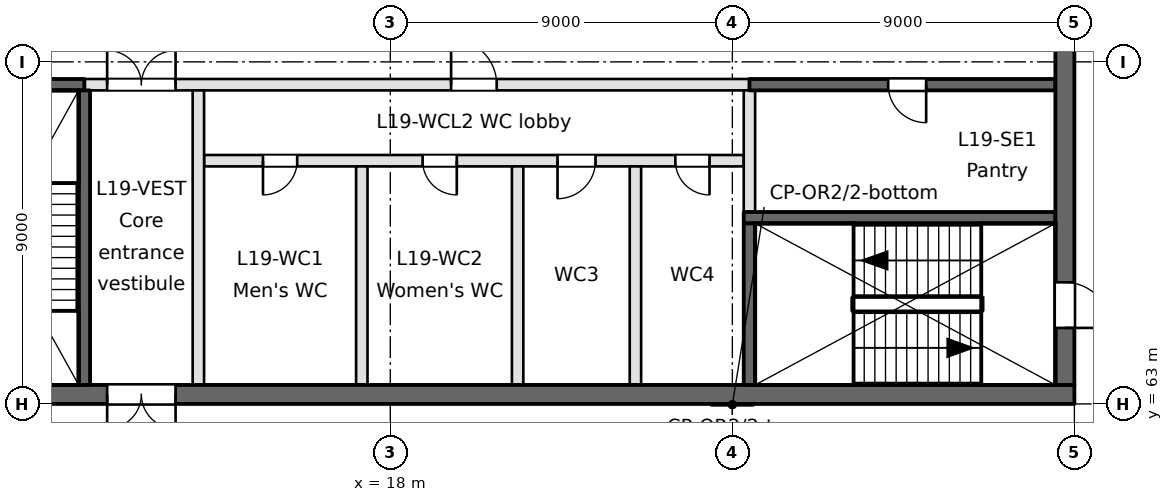
"""IFC4 building model, lengths in metres.
Left out: names, types, materials, properties, quantities, classifications, styles, units other than length and angle.
Written with IfcOpenShell. Run it as: python <this file> out.ifc"""

import sys

from ifc_helpers import new_model, si_unit, direction, frame, frame_2d, origin, place, context, subcontext, project, spatial, rectangle, extrude, element, fill, save


model = new_model("IFC4")
c1 = context("Model", 3, precision=1e-05, world=origin(), true_north=direction((0.0, 1.0)))
c2 = subcontext(c1, "Body", "Model", "MODEL_VIEW")
j1 = project(units=[si_unit("LENGTHUNIT", "METRE"), si_unit("PLANEANGLEUNIT", "RADIAN")], contexts=[c1])
p1 = place(None, origin())
s1 = spatial("IfcSite", under=j1, at=p1, CompositionType="ELEMENT")
p2 = place(p1, origin())
s2 = spatial("IfcBuilding", under=s1, at=p2, CompositionType="ELEMENT")
p3 = place(p2, frame((0.0, 0.0, 80.2)))
s3 = spatial("IfcBuildingStorey", under=s2, at=p3, CompositionType="ELEMENT", Elevation=80.2)
p4 = place(p3, frame((0.9, 63.25, -0.45), z_axis=(0.0, 0.0, 1.0), x_axis=(1.0, 0.0, 0.0)))
e1 = element("IfcWall", 1, at=p4, inside=s3, PredefinedType="SOLIDWALL", context=c2, shape_type="SweptSolid", body=[
    extrude(rectangle(XDim=35.1, YDim=0.5, at=frame_2d((17.55, 0.0))), origin(), (0.0, 0.0, 1.0), 4.65),
])
p5 = place(p4, frame((9.65, 0.0, 0.45)))
e2 = element("IfcOpeningElement", 2, at=p5, cuts=e1, PredefinedType="OPENING", context=c2, shape_type="SweptSolid", body=[
    extrude(rectangle(XDim=1.8, YDim=2.1, at=frame_2d((0.9, 1.05))), frame((0.0, 0.25, 0.0), z_axis=(0.0, -1.0, 0.0), x_axis=(1.0, 0.0, 0.0)), (0.0, 0.0, 1.0), 0.5),
])
p6 = place(p4, frame((1.55, 0.0, 0.45)))
e3 = element("IfcOpeningElement", 3, at=p6, cuts=e1, PredefinedType="OPENING", context=c2, shape_type="SweptSolid", body=[
    extrude(rectangle(XDim=1.2, YDim=2.1, at=frame_2d((0.6, 1.05))), frame((0.0, 0.25, 0.0), z_axis=(0.0, -1.0, 0.0), x_axis=(1.0, 0.0, 0.0)), (0.0, 0.0, 1.0), 0.5),
])
p7 = place(p4, frame((6.15, 0.0, 0.45)))
e4 = element("IfcOpeningElement", 4, at=p7, cuts=e1, PredefinedType="OPENING", context=c2, shape_type="SweptSolid", body=[
    extrude(rectangle(XDim=1.2, YDim=2.1, at=frame_2d((0.6, 1.05))), frame((0.0, 0.25, 0.0), z_axis=(0.0, -1.0, 0.0), x_axis=(1.0, 0.0, 0.0)), (0.0, 0.0, 1.0), 0.5),
])
p8 = place(p3, frame((27.3, 67.9, -0.45), z_axis=(0.0, 0.0, 1.0), x_axis=(1.0, 0.0, 0.0)))
e5 = element("IfcWall", 5, at=p8, inside=s3, PredefinedType="SOLIDWALL", context=c2, shape_type="SweptSolid", body=[
    extrude(rectangle(XDim=8.2, YDim=0.3, at=frame_2d((4.1, 0.0))), origin(), (0.0, 0.0, 1.0), 4.65),
])
p9 = place(p3, frame((13.1, 69.4, 0.0), z_axis=(0.0, 0.0, 1.0), x_axis=(1.0, 0.0, 0.0)))
e6 = element("IfcWall", 6, at=p9, inside=s3, PredefinedType="PARTITIONING", context=c2, shape_type="SweptSolid", body=[
    extrude(rectangle(XDim=14.2, YDim=0.3, at=frame_2d((7.1, 0.0))), origin(), (0.0, 0.0, 1.0), 4.2),
])
p10 = place(p9, frame((1.55, 0.0, 0.0)))
e7 = element("IfcOpeningElement", 7, at=p10, cuts=e6, PredefinedType="OPENING", context=c2, shape_type="SweptSolid", body=[
    extrude(rectangle(XDim=0.9, YDim=2.1, at=frame_2d((0.45, 1.05))), frame((0.0, 0.15, 0.0), z_axis=(0.0, -1.0, 0.0), x_axis=(1.0, 0.0, 0.0)), (0.0, 0.0, 1.0), 0.3),
])
p11 = place(p9, frame((5.75, 0.0, 0.0)))
e8 = element("IfcOpeningElement", 8, at=p11, cuts=e6, PredefinedType="OPENING", context=c2, shape_type="SweptSolid", body=[
    extrude(rectangle(XDim=0.9, YDim=2.1, at=frame_2d((0.45, 1.05))), frame((0.0, 0.15, 0.0), z_axis=(0.0, -1.0, 0.0), x_axis=(1.0, 0.0, 0.0)), (0.0, 0.0, 1.0), 0.3),
])
p12 = place(p9, frame((9.3, 0.0, 0.0)))
e9 = element("IfcOpeningElement", 9, at=p12, cuts=e6, PredefinedType="OPENING", context=c2, shape_type="SweptSolid", body=[
    extrude(rectangle(XDim=1.0, YDim=2.1, at=frame_2d((0.5, 1.05))), frame((0.0, 0.15, 0.0), z_axis=(0.0, -1.0, 0.0), x_axis=(1.0, 0.0, 0.0)), (0.0, 0.0, 1.0), 0.3),
])
p13 = place(p9, frame((12.4, 0.0, 0.0)))
e10 = element("IfcOpeningElement", 10, at=p13, cuts=e6, PredefinedType="OPENING", context=c2, shape_type="SweptSolid", body=[
    extrude(rectangle(XDim=0.9, YDim=2.1, at=frame_2d((0.45, 1.05))), frame((0.0, 0.15, 0.0), z_axis=(0.0, -1.0, 0.0), x_axis=(1.0, 0.0, 0.0)), (0.0, 0.0, 1.0), 0.3),
])
p14 = place(p3, frame((0.9, 71.4, -0.45), z_axis=(0.0, 0.0, 1.0), x_axis=(1.0, 0.0, 0.0)))
e11 = element("IfcWall", 11, at=p14, inside=s3, PredefinedType="SOLIDWALL", context=c2, shape_type="SweptSolid", body=[
    extrude(rectangle(XDim=9.05, YDim=0.3, at=frame_2d((4.525, 0.0))), origin(), (0.0, 0.0, 1.0), 4.65),
])
p15 = place(p3, frame((9.95, 71.4, 0.0), z_axis=(0.0, 0.0, 1.0), x_axis=(1.0, 0.0, 0.0)))
e12 = element("IfcWall", 12, at=p15, inside=s3, PredefinedType="PARTITIONING", context=c2, shape_type="SweptSolid", body=[
    extrude(rectangle(XDim=17.5, YDim=0.3, at=frame_2d((8.75, 0.0))), origin(), (0.0, 0.0, 1.0), 4.2),
])
p16 = place(p15, frame((0.6, 0.0, 0.0)))
e13 = element("IfcOpeningElement", 13, at=p16, cuts=e12, PredefinedType="OPENING", context=c2, shape_type="SweptSolid", body=[
    extrude(rectangle(XDim=1.8, YDim=2.1, at=frame_2d((0.9, 1.05))), frame((0.0, 0.15, 0.0), z_axis=(0.0, -1.0, 0.0), x_axis=(1.0, 0.0, 0.0)), (0.0, 0.0, 1.0), 0.3),
])
p17 = place(p15, frame((9.65, 0.0, 0.0)))
e14 = element("IfcOpeningElement", 14, at=p17, cuts=e12, PredefinedType="OPENING", context=c2, shape_type="SweptSolid", body=[
    extrude(rectangle(XDim=1.2, YDim=2.1, at=frame_2d((0.6, 1.05))), frame((0.0, 0.15, 0.0), z_axis=(0.0, -1.0, 0.0), x_axis=(1.0, 0.0, 0.0)), (0.0, 0.0, 1.0), 0.3),
])
p18 = place(p3, frame((27.45, 71.4, 0.0), z_axis=(0.0, 0.0, 1.0), x_axis=(1.0, 0.0, 0.0)))
e15 = element("IfcWall", 15, at=p18, inside=s3, PredefinedType="SOLIDWALL", context=c2, shape_type="SweptSolid", body=[
    extrude(rectangle(XDim=8.05, YDim=0.3, at=frame_2d((4.025, 0.0))), origin(), (0.0, 0.0, 1.0), 4.2),
])
p19 = place(p18, frame((3.65, 0.0, 0.0)))
e16 = element("IfcOpeningElement", 16, at=p19, cuts=e15, PredefinedType="OPENING", context=c2, shape_type="SweptSolid", body=[
    extrude(rectangle(XDim=1.0, YDim=2.1, at=frame_2d((0.5, 1.05))), frame((0.0, 0.15, 0.0), z_axis=(0.0, -1.0, 0.0), x_axis=(1.0, 0.0, 0.0)), (0.0, 0.0, 1.0), 0.3),
])
p20 = place(p3, frame((9.95, 63.5, -0.45), z_axis=(0.0, 0.0, 1.0), x_axis=(0.0, 1.0, 0.0)))
e17 = element("IfcWall", 17, at=p20, inside=s3, PredefinedType="SOLIDWALL", context=c2, shape_type="SweptSolid", body=[
    extrude(rectangle(XDim=7.75, YDim=0.3, at=frame_2d((3.875, 0.0))), origin(), (0.0, 0.0, 1.0), 4.65),
])
p21 = place(p3, frame((12.95, 63.5, 0.0), z_axis=(0.0, 0.0, 1.0), x_axis=(0.0, 1.0, 0.0)))
e18 = element("IfcWall", 18, at=p21, inside=s3, PredefinedType="PARTITIONING", context=c2, shape_type="SweptSolid", body=[
    extrude(rectangle(XDim=7.75, YDim=0.3, at=frame_2d((3.875, 0.0))), origin(), (0.0, 0.0, 1.0), 4.2),
])
for number, where, z_axis, x_axis in (
    (19, (17.25, 63.5, 0.0), (0.0, 0.0, 1.0), (0.0, 1.0, 0.0)),
    (20, (21.35, 63.5, 0.0), (0.0, 0.0, 1.0), (0.0, 1.0, 0.0)),
    (21, (24.45, 63.5, 0.0), (0.0, 0.0, 1.0), (0.0, 1.0, 0.0)),
):
    element("IfcWall", number, at=place(p3, frame(where, z_axis=z_axis, x_axis=x_axis)), inside=s3, PredefinedType="PARTITIONING", context=c2, shape_type="SweptSolid", body=[
        extrude(rectangle(XDim=5.75, YDim=0.3, at=frame_2d((2.875, 0.0))), origin(), (0.0, 0.0, 1.0), 4.2),
    ])
p22 = place(p3, frame((27.45, 63.5, -0.45), z_axis=(0.0, 0.0, 1.0), x_axis=(0.0, 1.0, 0.0)))
e22 = element("IfcWall", 22, at=p22, inside=s3, PredefinedType="SOLIDWALL", context=c2, shape_type="SweptSolid", body=[
    extrude(rectangle(XDim=4.25, YDim=0.3, at=frame_2d((2.125, 0.0))), origin(), (0.0, 0.0, 1.0), 4.65),
])
p23 = place(p3, frame((27.45, 68.05, 0.0), z_axis=(0.0, 0.0, 1.0), x_axis=(0.0, 1.0, 0.0)))
e23 = element("IfcWall", 23, at=p23, inside=s3, PredefinedType="PARTITIONING", context=c2, shape_type="SweptSolid", body=[
    extrude(rectangle(XDim=3.2, YDim=0.3, at=frame_2d((1.6, 0.0))), origin(), (0.0, 0.0, 1.0), 4.2),
])
p24 = place(p3, frame((35.75, 63.5, -0.45), z_axis=(0.0, 0.0, 1.0), x_axis=(0.0, 1.0, 0.0)))
e24 = element("IfcWall", 24, at=p24, inside=s3, PredefinedType="SOLIDWALL", context=c2, shape_type="SweptSolid", body=[
    extrude(rectangle(XDim=34.6, YDim=0.5, at=frame_2d((17.3, 0.0))), origin(), (0.0, 0.0, 1.0), 4.65),
])
p25 = place(p24, frame((9.7, 0.0, 0.45)))
e25 = element("IfcOpeningElement", 25, at=p25, cuts=e24, PredefinedType="OPENING", context=c2, shape_type="SweptSolid", body=[
    extrude(rectangle(XDim=2.4, YDim=2.1, at=frame_2d((1.2, 1.05))), frame((0.0, 0.25, 0.0), z_axis=(0.0, -1.0, 0.0), x_axis=(1.0, 0.0, 0.0)), (0.0, 0.0, 1.0), 0.5),
])
p26 = place(p24, frame((27.9, 0.0, 0.45)))
e26 = element("IfcOpeningElement", 26, at=p26, cuts=e24, PredefinedType="OPENING", context=c2, shape_type="SweptSolid", body=[
    extrude(rectangle(XDim=1.5, YDim=2.1, at=frame_2d((0.75, 1.05))), frame((0.0, 0.25, 0.0), z_axis=(0.0, -1.0, 0.0), x_axis=(1.0, 0.0, 0.0)), (0.0, 0.0, 1.0), 0.5),
])
p27 = place(p24, frame((1.5, 0.0, 0.45)))
e27 = element("IfcOpeningElement", 27, at=p27, cuts=e24, PredefinedType="OPENING", context=c2, shape_type="SweptSolid", body=[
    extrude(rectangle(XDim=1.2, YDim=2.1, at=frame_2d((0.6, 1.05))), frame((0.0, 0.25, 0.0), z_axis=(0.0, -1.0, 0.0), x_axis=(1.0, 0.0, 0.0)), (0.0, 0.0, 1.0), 0.5),
])
p28 = place(p5, frame((1.8, 0.0, 0.0), z_axis=(0.0, 0.0, 1.0), x_axis=(-1.0, 0.0, 0.0)))
e28 = element("IfcDoor", 28, at=p28, inside=s3, OperationType="DOUBLE_DOOR_SINGLE_SWING", PredefinedType="DOOR", context=c2, shape_type="SweptSolid", body=[
    extrude(rectangle(XDim=1.8, YDim=2.1, at=frame_2d((0.9, 1.05))), frame((0.0, 0.025, 0.0), z_axis=(0.0, -1.0, 0.0), x_axis=(1.0, 0.0, 0.0)), (0.0, 0.0, 1.0), 0.05),
])
fill(e2, e28)
p29 = place(p16, origin())
e29 = element("IfcDoor", 29, at=p29, inside=s3, OperationType="DOUBLE_DOOR_SINGLE_SWING", PredefinedType="DOOR", context=c2, shape_type="SweptSolid", body=[
    extrude(rectangle(XDim=1.8, YDim=2.1, at=frame_2d((0.9, 1.05))), frame((0.0, 0.025, 0.0), z_axis=(0.0, -1.0, 0.0), x_axis=(1.0, 0.0, 0.0)), (0.0, 0.0, 1.0), 0.05),
])
fill(e13, e29)
p30 = place(p10, frame((0.9, 0.0, 0.0), z_axis=(0.0, 0.0, 1.0), x_axis=(-1.0, 0.0, 0.0)))
e30 = element("IfcDoor", 30, at=p30, inside=s3, OperationType="SINGLE_SWING_RIGHT", PredefinedType="DOOR", context=c2, shape_type="SweptSolid", body=[
    extrude(rectangle(XDim=0.9, YDim=2.1, at=frame_2d((0.45, 1.05))), frame((0.0, 0.025, 0.0), z_axis=(0.0, -1.0, 0.0), x_axis=(1.0, 0.0, 0.0)), (0.0, 0.0, 1.0), 0.05),
])
fill(e7, e30)
p31 = place(p11, frame((0.9, 0.0, 0.0), z_axis=(0.0, 0.0, 1.0), x_axis=(-1.0, 0.0, 0.0)))
e31 = element("IfcDoor", 31, at=p31, inside=s3, OperationType="SINGLE_SWING_LEFT", PredefinedType="DOOR", context=c2, shape_type="SweptSolid", body=[
    extrude(rectangle(XDim=0.9, YDim=2.1, at=frame_2d((0.45, 1.05))), frame((0.0, 0.025, 0.0), z_axis=(0.0, -1.0, 0.0), x_axis=(1.0, 0.0, 0.0)), (0.0, 0.0, 1.0), 0.05),
])
fill(e8, e31)
p32 = place(p12, frame((1.0, 0.0, 0.0), z_axis=(0.0, 0.0, 1.0), x_axis=(-1.0, 0.0, 0.0)))
e32 = element("IfcDoor", 32, at=p32, inside=s3, OperationType="SINGLE_SWING_RIGHT", PredefinedType="DOOR", context=c2, shape_type="SweptSolid", body=[
    extrude(rectangle(XDim=1.0, YDim=2.1, at=frame_2d((0.5, 1.05))), frame((0.0, 0.025, 0.0), z_axis=(0.0, -1.0, 0.0), x_axis=(1.0, 0.0, 0.0)), (0.0, 0.0, 1.0), 0.05),
])
fill(e9, e32)
p33 = place(p13, frame((0.9, 0.0, 0.0), z_axis=(0.0, 0.0, 1.0), x_axis=(-1.0, 0.0, 0.0)))
e33 = element("IfcDoor", 33, at=p33, inside=s3, OperationType="SINGLE_SWING_LEFT", PredefinedType="DOOR", context=c2, shape_type="SweptSolid", body=[
    extrude(rectangle(XDim=0.9, YDim=2.1, at=frame_2d((0.45, 1.05))), frame((0.0, 0.025, 0.0), z_axis=(0.0, -1.0, 0.0), x_axis=(1.0, 0.0, 0.0)), (0.0, 0.0, 1.0), 0.05),
])
fill(e10, e33)
p34 = place(p17, origin())
e34 = element("IfcDoor", 34, at=p34, inside=s3, OperationType="SINGLE_SWING_LEFT", PredefinedType="DOOR", context=c2, shape_type="SweptSolid", body=[
    extrude(rectangle(XDim=1.2, YDim=2.1, at=frame_2d((0.6, 1.05))), frame((0.0, 0.025, 0.0), z_axis=(0.0, -1.0, 0.0), x_axis=(1.0, 0.0, 0.0)), (0.0, 0.0, 1.0), 0.05),
])
fill(e14, e34)
p35 = place(p27, frame((1.2, 0.0, 0.0), z_axis=(0.0, 0.0, 1.0), x_axis=(-1.0, 0.0, 0.0)))
e35 = element("IfcDoor", 35, at=p35, inside=s3, OperationType="SINGLE_SWING_RIGHT", PredefinedType="DOOR", context=c2, shape_type="SweptSolid", body=[
    extrude(rectangle(XDim=1.2, YDim=2.1, at=frame_2d((0.6, 1.05))), frame((0.0, 0.025, 0.0), z_axis=(0.0, -1.0, 0.0), x_axis=(1.0, 0.0, 0.0)), (0.0, 0.0, 1.0), 0.05),
])
fill(e27, e35)
p36 = place(p19, frame((1.0, 0.0, 0.0), z_axis=(0.0, 0.0, 1.0), x_axis=(-1.0, 0.0, 0.0)))
e36 = element("IfcDoor", 36, at=p36, inside=s3, OperationType="SINGLE_SWING_LEFT", PredefinedType="DOOR", context=c2, shape_type="SweptSolid", body=[
    extrude(rectangle(XDim=1.0, YDim=2.1, at=frame_2d((0.5, 1.05))), frame((0.0, 0.025, 0.0), z_axis=(0.0, -1.0, 0.0), x_axis=(1.0, 0.0, 0.0)), (0.0, 0.0, 1.0), 0.05),
])
fill(e16, e36)
save(model, sys.argv[1])
